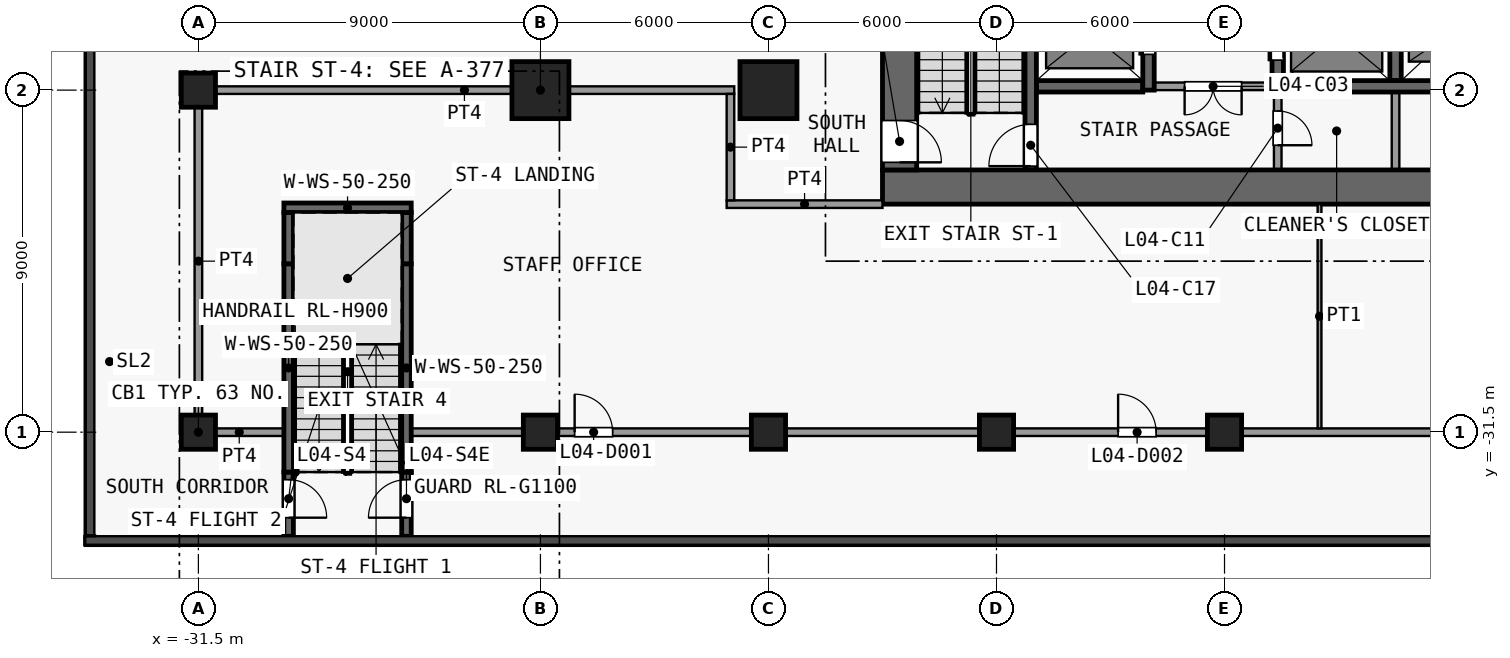
"""IFC4 building model, lengths in metres.
Left out: names, types, materials, properties, quantities, classifications, styles, units other than length and angle.
Written with IfcOpenShell. Run it as: python <this file> out.ifc"""

import sys

from ifc_helpers import new_model, si_unit, direction, frame, frame_2d, origin, origin_2d, place, context, subcontext, project, spatial, rectangle, extrude, element, fill, save


model = new_model("IFC4")
c1 = context("Model", 3, precision=1e-05, world=origin(), true_north=direction((0.0, 1.0)))
c2 = subcontext(c1, "Body", "Model", "MODEL_VIEW")
j1 = project(units=[si_unit("LENGTHUNIT", "METRE"), si_unit("PLANEANGLEUNIT", "RADIAN")], contexts=[c1])
p1 = place(None, origin())
s1 = spatial("IfcSite", under=j1, at=p1, CompositionType="ELEMENT")
p2 = place(p1, origin())
s2 = spatial("IfcBuilding", under=s1, at=p2, CompositionType="ELEMENT")
p3 = place(p2, frame((0.0, 0.0, 23.5)))
s3 = spatial("IfcBuildingStorey", under=s2, at=p3, CompositionType="ELEMENT", Elevation=23.5)
for number, where, z_axis, x_axis in (
    (1, (-31.5, -31.5, 0.0), (0.0, 0.0, 1.0), (1.0, 0.0, 0.0)),
    (2, (-31.5, -22.5, 0.0), (0.0, 0.0, 1.0), (1.0, 0.0, 0.0)),
    (3, (-22.5, -31.5, 0.0), (0.0, 0.0, 1.0), (1.0, 0.0, 0.0)),
):
    element("IfcColumn", number, at=place(p3, frame(where, z_axis=z_axis, x_axis=x_axis)), inside=s3, PredefinedType="COLUMN", context=c2, shape_type="SweptSolid", body=[
        extrude(rectangle(XDim=0.9, YDim=0.9, at=origin_2d()), origin(), (0.0, 0.0, 1.0), 4.5),
    ])
p4 = place(p3, frame((-22.5, -22.5, 0.0), z_axis=(0.0, 0.0, 1.0), x_axis=(1.0, 0.0, 0.0)))
e4 = element("IfcColumn", 4, at=p4, inside=s3, PredefinedType="COLUMN", context=c2, shape_type="SweptSolid", body=[
    extrude(rectangle(XDim=1.5, YDim=1.5, at=origin_2d()), origin(), (0.0, 0.0, 1.0), 4.5),
])
p5 = place(p3, frame((-16.5, -31.5, 0.0), z_axis=(0.0, 0.0, 1.0), x_axis=(1.0, 0.0, 0.0)))
e5 = element("IfcColumn", 5, at=p5, inside=s3, PredefinedType="COLUMN", context=c2, shape_type="SweptSolid", body=[
    extrude(rectangle(XDim=0.9, YDim=0.9, at=origin_2d()), origin(), (0.0, 0.0, 1.0), 4.5),
])
p6 = place(p3, frame((-16.5, -22.5, 0.0), z_axis=(0.0, 0.0, 1.0), x_axis=(1.0, 0.0, 0.0)))
e6 = element("IfcColumn", 6, at=p6, inside=s3, PredefinedType="COLUMN", context=c2, shape_type="SweptSolid", body=[
    extrude(rectangle(XDim=1.5, YDim=1.5, at=origin_2d()), origin(), (0.0, 0.0, 1.0), 4.5),
])
for number, where, z_axis, x_axis in (
    (7, (-10.5, -31.5, 0.0), (0.0, 0.0, 1.0), (1.0, 0.0, 0.0)),
    (8, (-4.5, -31.5, 0.0), (0.0, 0.0, 1.0), (1.0, 0.0, 0.0)),
):
    element("IfcColumn", number, at=place(p3, frame(where, z_axis=z_axis, x_axis=x_axis)), inside=s3, PredefinedType="COLUMN", context=c2, shape_type="SweptSolid", body=[
        extrude(rectangle(XDim=0.9, YDim=0.9, at=origin_2d()), origin(), (0.0, 0.0, 1.0), 4.5),
    ])
p7 = place(p3, frame((-13.5, -25.05, 0.0), z_axis=(0.0, 0.0, 1.0), x_axis=(1.0, 0.0, 0.0)))
e9 = element("IfcWall", 9, at=p7, inside=s3, PredefinedType="SHEAR", context=c2, shape_type="SweptSolid", body=[
    extrude(rectangle(XDim=27.0, YDim=0.9, at=frame_2d((13.5, 0.0))), origin(), (0.0, 0.0, 1.0), 4.15),
])
p8 = place(p3, frame((-13.05, -8.5, 0.0), z_axis=(0.0, 0.0, 1.0), x_axis=(0.0, -1.0, 0.0)))
e10 = element("IfcWall", 10, at=p8, inside=s3, PredefinedType="SHEAR", context=c2, shape_type="SweptSolid", body=[
    extrude(rectangle(XDim=16.1, YDim=0.9, at=frame_2d((8.05, 0.0))), origin(), (0.0, 0.0, 1.0), 4.15),
])
p9 = place(p8, frame((14.8, 0.0, 0.0)))
e11 = element("IfcOpeningElement", 11, at=p9, cuts=e10, PredefinedType="OPENING", context=c2, shape_type="SweptSolid", body=[
    extrude(rectangle(XDim=1.1, YDim=2.1, at=frame_2d((0.55, 1.05))), frame((0.0, 0.46, 0.0), z_axis=(0.0, -1.0, 0.0), x_axis=(1.0, 0.0, 0.0)), (0.0, 0.0, 1.0), 0.92),
])
p10 = place(p3, frame((-9.45, -22.4, 0.0), z_axis=(0.0, 0.0, 1.0), x_axis=(1.0, 0.0, 0.0)))
e12 = element("IfcWall", 12, at=p10, inside=s3, PredefinedType="SHEAR", context=c2, shape_type="SweptSolid", body=[
    extrude(rectangle(XDim=2.8, YDim=0.3, at=frame_2d((1.4, 0.0))), origin(), (0.0, 0.0, 1.0), 4.15),
])
p11 = place(p3, frame((-3.25, -22.4, 0.0), z_axis=(0.0, 0.0, 1.0), x_axis=(-1.0, 0.0, 0.0)))
e13 = element("IfcWall", 13, at=p11, inside=s3, PredefinedType="PARTITIONING", context=c2, shape_type="SweptSolid", body=[
    extrude(rectangle(XDim=3.1, YDim=0.2, at=frame_2d((1.55, 0.0))), origin(), (0.0, 0.0, 1.0), 4.15),
])
p12 = place(p11, frame((0.8, 0.0, 0.0)))
e14 = element("IfcOpeningElement", 14, at=p12, cuts=e13, PredefinedType="OPENING", context=c2, shape_type="SweptSolid", body=[
    extrude(rectangle(XDim=1.5, YDim=2.1, at=frame_2d((0.75, 1.05))), frame((0.0, 0.11, 0.0), z_axis=(0.0, -1.0, 0.0), x_axis=(1.0, 0.0, 0.0)), (0.0, 0.0, 1.0), 0.22),
])
p13 = place(p3, frame((-2.95, -22.4, 0.0), z_axis=(0.0, 0.0, 1.0), x_axis=(1.0, 0.0, 0.0)))
e15 = element("IfcWall", 15, at=p13, inside=s3, PredefinedType="SHEAR", context=c2, shape_type="SweptSolid", body=[
    extrude(rectangle(XDim=6.2, YDim=0.3, at=frame_2d((3.1, 0.0))), origin(), (0.0, 0.0, 1.0), 4.15),
])
p14 = place(p3, frame((-9.6, -24.6, 0.0), z_axis=(0.0, 0.0, 1.0), x_axis=(0.0, 1.0, 0.0)))
e16 = element("IfcWall", 16, at=p14, inside=s3, PredefinedType="SHEAR", context=c2, shape_type="SweptSolid", body=[
    extrude(rectangle(XDim=7.7, YDim=0.3, at=frame_2d((3.85, 0.0))), origin(), (0.0, 0.0, 1.0), 4.15),
])
p15 = place(p14, frame((0.1, 0.0, 0.0)))
e17 = element("IfcOpeningElement", 17, at=p15, cuts=e16, PredefinedType="OPENING", context=c2, shape_type="SweptSolid", body=[
    extrude(rectangle(XDim=1.1, YDim=2.1, at=frame_2d((0.55, 1.05))), frame((0.0, 0.16, 0.0), z_axis=(0.0, -1.0, 0.0), x_axis=(1.0, 0.0, 0.0)), (0.0, 0.0, 1.0), 0.32),
])
p16 = place(p3, frame((-6.5, -22.5, 0.0), z_axis=(0.0, 0.0, 1.0), x_axis=(0.0, 1.0, 0.0)))
e18 = element("IfcWall", 18, at=p16, inside=s3, PredefinedType="SHEAR", context=c2, shape_type="SweptSolid", body=[
    extrude(rectangle(XDim=14.0, YDim=0.3, at=frame_2d((7.0, 0.0))), origin(), (0.0, 0.0, 1.0), 4.15),
])
p17 = place(p16, frame((0.94, 0.0, 0.0)))
e19 = element("IfcOpeningElement", 19, at=p17, cuts=e18, PredefinedType="OPENING", context=c2, shape_type="SweptSolid", body=[
    extrude(rectangle(XDim=1.1, YDim=2.1, at=frame_2d((0.55, 1.05))), frame((0.0, 0.16, 0.0), z_axis=(0.0, -1.0, 0.0), x_axis=(1.0, 0.0, 0.0)), (0.0, 0.0, 1.0), 0.32),
])
p18 = place(p16, frame((3.72, 0.0, 0.0)))
e20 = element("IfcOpeningElement", 20, at=p18, cuts=e18, PredefinedType="OPENING", context=c2, shape_type="SweptSolid", body=[
    extrude(rectangle(XDim=1.1, YDim=2.1, at=frame_2d((0.55, 1.05))), frame((0.0, 0.16, 0.0), z_axis=(0.0, -1.0, 0.0), x_axis=(1.0, 0.0, 0.0)), (0.0, 0.0, 1.0), 0.32),
])
p19 = place(p16, frame((6.5, 0.0, 0.0)))
e21 = element("IfcOpeningElement", 21, at=p19, cuts=e18, PredefinedType="OPENING", context=c2, shape_type="SweptSolid", body=[
    extrude(rectangle(XDim=1.1, YDim=2.1, at=frame_2d((0.55, 1.05))), frame((0.0, 0.16, 0.0), z_axis=(0.0, -1.0, 0.0), x_axis=(1.0, 0.0, 0.0)), (0.0, 0.0, 1.0), 0.32),
])
p20 = place(p16, frame((9.28, 0.0, 0.0)))
e22 = element("IfcOpeningElement", 22, at=p20, cuts=e18, PredefinedType="OPENING", context=c2, shape_type="SweptSolid", body=[
    extrude(rectangle(XDim=1.1, YDim=2.1, at=frame_2d((0.55, 1.05))), frame((0.0, 0.16, 0.0), z_axis=(0.0, -1.0, 0.0), x_axis=(1.0, 0.0, 0.0)), (0.0, 0.0, 1.0), 0.32),
])
p21 = place(p16, frame((12.06, 0.0, 0.0)))
e23 = element("IfcOpeningElement", 23, at=p21, cuts=e18, PredefinedType="OPENING", context=c2, shape_type="SweptSolid", body=[
    extrude(rectangle(XDim=1.1, YDim=2.1, at=frame_2d((0.55, 1.05))), frame((0.0, 0.16, 0.0), z_axis=(0.0, -1.0, 0.0), x_axis=(1.0, 0.0, 0.0)), (0.0, 0.0, 1.0), 0.32),
])
p22 = place(p3, frame((-3.1, -22.55, 0.0), z_axis=(0.0, 0.0, 1.0), x_axis=(0.0, -1.0, 0.0)))
e24 = element("IfcWall", 24, at=p22, inside=s3, PredefinedType="PARTITIONING", context=c2, shape_type="SweptSolid", body=[
    extrude(rectangle(XDim=2.05, YDim=0.2, at=frame_2d((1.025, 0.0))), origin(), (0.0, 0.0, 1.0), 4.15),
])
p23 = place(p22, frame((0.5, 0.0, 0.0)))
e25 = element("IfcOpeningElement", 25, at=p23, cuts=e24, PredefinedType="OPENING", context=c2, shape_type="SweptSolid", body=[
    extrude(rectangle(XDim=0.9, YDim=2.1, at=frame_2d((0.45, 1.05))), frame((0.0, 0.11, 0.0), z_axis=(0.0, -1.0, 0.0), x_axis=(1.0, 0.0, 0.0)), (0.0, 0.0, 1.0), 0.22),
])
p24 = place(p3, frame((-3.1, -22.55, 0.0), z_axis=(0.0, 0.0, 1.0), x_axis=(0.0, 1.0, 0.0)))
e26 = element("IfcWall", 26, at=p24, inside=s3, PredefinedType="SHEAR", context=c2, shape_type="SweptSolid", body=[
    extrude(rectangle(XDim=14.05, YDim=0.3, at=frame_2d((7.025, 0.0))), origin(), (0.0, 0.0, 1.0), 4.15),
])
p25 = place(p24, frame((12.11, 0.0, 0.0)))
e27 = element("IfcOpeningElement", 27, at=p25, cuts=e26, PredefinedType="OPENING", context=c2, shape_type="SweptSolid", body=[
    extrude(rectangle(XDim=1.1, YDim=2.1, at=frame_2d((0.55, 1.05))), frame((0.0, 0.16, 0.0), z_axis=(0.0, -1.0, 0.0), x_axis=(1.0, 0.0, 0.0)), (0.0, 0.0, 1.0), 0.32),
])
p26 = place(p24, frame((0.84, 0.0, 0.0)))
e28 = element("IfcOpeningElement", 28, at=p26, cuts=e26, PredefinedType="OPENING", context=c2, shape_type="SweptSolid", body=[
    extrude(rectangle(XDim=1.4, YDim=2.1, at=frame_2d((0.7, 1.05))), frame((0.0, 0.16, 0.0), z_axis=(0.0, -1.0, 0.0), x_axis=(1.0, 0.0, 0.0)), (0.0, 0.0, 1.0), 0.32),
])
p27 = place(p3, frame((0.0, -24.6, 0.0), z_axis=(0.0, 0.0, 1.0), x_axis=(0.0, 1.0, 0.0)))
e29 = element("IfcWall", 29, at=p27, inside=s3, PredefinedType="PARTITIONING", context=c2, shape_type="SweptSolid", body=[
    extrude(rectangle(XDim=2.05, YDim=0.2, at=frame_2d((1.025, 0.0))), origin(), (0.0, 0.0, 1.0), 4.15),
])
p28 = place(p3, frame((0.0, -22.25, 0.0), z_axis=(0.0, 0.0, 1.0), x_axis=(0.0, 1.0, 0.0)))
e30 = element("IfcWall", 30, at=p28, inside=s3, PredefinedType="SHEAR", context=c2, shape_type="SweptSolid", body=[
    extrude(rectangle(XDim=13.75, YDim=0.3, at=frame_2d((6.875, 0.0))), origin(), (0.0, 0.0, 1.0), 4.15),
])
p29 = place(p3, frame((-29.125, -32.55, 0.0), z_axis=(0.0, 0.0, 1.0), x_axis=(0.0, -1.0, 0.0)))
e31 = element("IfcWall", 31, at=p29, inside=s3, PredefinedType="SHEAR", context=c2, shape_type="SweptSolid", body=[
    extrude(rectangle(XDim=1.69, YDim=0.25, at=frame_2d((0.845, 0.0))), origin(), (0.0, 0.0, 1.0), 4.15),
])
p30 = place(p29, frame((0.2, 0.0, 0.0)))
e32 = element("IfcOpeningElement", 32, at=p30, cuts=e31, PredefinedType="OPENING", context=c2, shape_type="SweptSolid", body=[
    extrude(rectangle(XDim=1.0, YDim=2.1, at=frame_2d((0.5, 1.05))), frame((0.0, 0.135, 0.0), z_axis=(0.0, -1.0, 0.0), x_axis=(1.0, 0.0, 0.0)), (0.0, 0.0, 1.0), 0.27),
])
p31 = place(p3, frame((-29.125, -32.55, 0.0), z_axis=(0.0, 0.0, 1.0), x_axis=(0.0, 1.0, 0.0)))
e33 = element("IfcWall", 33, at=p31, inside=s3, PredefinedType="SHEAR", context=c2, shape_type="SweptSolid", body=[
    extrude(rectangle(XDim=5.48, YDim=0.25, at=frame_2d((2.74, 0.0))), origin(), (0.0, 0.0, 1.0), 4.15),
])
p32 = place(p3, frame((-29.125, -27.07, 0.0), z_axis=(0.0, 0.0, 1.0), x_axis=(0.0, 1.0, 0.0)))
e34 = element("IfcWall", 34, at=p32, inside=s3, PredefinedType="SHEAR", context=c2, shape_type="SweptSolid", body=[
    extrude(rectangle(XDim=1.35, YDim=0.25, at=frame_2d((0.675, 0.0))), origin(), (0.0, 0.0, 1.0), 4.15),
])
p33 = place(p3, frame((-26.025, -34.24, 0.0), z_axis=(0.0, 0.0, 1.0), x_axis=(0.0, 1.0, 0.0)))
e35 = element("IfcWall", 35, at=p33, inside=s3, PredefinedType="SHEAR", context=c2, shape_type="SweptSolid", body=[
    extrude(rectangle(XDim=1.69, YDim=0.25, at=frame_2d((0.845, 0.0))), origin(), (0.0, 0.0, 1.0), 4.15),
])
p34 = place(p33, frame((0.49, 0.0, 0.0)))
e36 = element("IfcOpeningElement", 36, at=p34, cuts=e35, PredefinedType="OPENING", context=c2, shape_type="SweptSolid", body=[
    extrude(rectangle(XDim=1.0, YDim=2.1, at=frame_2d((0.5, 1.05))), frame((0.0, 0.135, 0.0), z_axis=(0.0, -1.0, 0.0), x_axis=(1.0, 0.0, 0.0)), (0.0, 0.0, 1.0), 0.27),
])
p35 = place(p3, frame((-26.025, -32.55, 0.0), z_axis=(0.0, 0.0, 1.0), x_axis=(0.0, 1.0, 0.0)))
e37 = element("IfcWall", 37, at=p35, inside=s3, PredefinedType="SHEAR", context=c2, shape_type="SweptSolid", body=[
    extrude(rectangle(XDim=5.48, YDim=0.25, at=frame_2d((2.74, 0.0))), origin(), (0.0, 0.0, 1.0), 4.15),
])
p36 = place(p3, frame((-26.025, -27.07, 0.0), z_axis=(0.0, 0.0, 1.0), x_axis=(0.0, 1.0, 0.0)))
e38 = element("IfcWall", 38, at=p36, inside=s3, PredefinedType="SHEAR", context=c2, shape_type="SweptSolid", body=[
    extrude(rectangle(XDim=1.35, YDim=0.25, at=frame_2d((0.675, 0.0))), origin(), (0.0, 0.0, 1.0), 4.15),
])
p37 = place(p3, frame((-29.25, -25.595, 0.0), z_axis=(0.0, 0.0, 1.0), x_axis=(1.0, 0.0, 0.0)))
e39 = element("IfcWall", 39, at=p37, inside=s3, PredefinedType="SHEAR", context=c2, shape_type="SweptSolid", body=[
    extrude(rectangle(XDim=3.35, YDim=0.25, at=frame_2d((1.675, 0.0))), origin(), (0.0, 0.0, 1.0), 4.15),
])
p38 = place(p3, frame((-31.6, -31.5, 0.0), z_axis=(0.0, 0.0, 1.0), x_axis=(1.0, 0.0, 0.0)))
e40 = element("IfcWall", 40, at=p38, inside=s3, PredefinedType="PARTITIONING", context=c2, shape_type="SweptSolid", body=[
    extrude(rectangle(XDim=2.35, YDim=0.2, at=frame_2d((1.175, 0.0))), origin(), (0.0, 0.0, 1.0), 4.15),
])
p39 = place(p3, frame((-25.9, -31.5, 0.0), z_axis=(0.0, 0.0, 1.0), x_axis=(1.0, 0.0, 0.0)))
e41 = element("IfcWall", 41, at=p39, inside=s3, PredefinedType="PARTITIONING", context=c2, shape_type="SweptSolid", body=[
    extrude(rectangle(XDim=78.15, YDim=0.2, at=frame_2d((39.075, 0.0))), origin(), (0.0, 0.0, 1.0), 4.15),
])
p40 = place(p39, frame((4.3, 0.0, 0.0)))
e42 = element("IfcOpeningElement", 42, at=p40, cuts=e41, PredefinedType="OPENING", context=c2, shape_type="SweptSolid", body=[
    extrude(rectangle(XDim=1.0, YDim=2.1, at=frame_2d((0.5, 1.05))), frame((0.0, 0.11, 0.0), z_axis=(0.0, -1.0, 0.0), x_axis=(1.0, 0.0, 0.0)), (0.0, 0.0, 1.0), 0.22),
])
p41 = place(p39, frame((18.6, 0.0, 0.0)))
e43 = element("IfcOpeningElement", 43, at=p41, cuts=e41, PredefinedType="OPENING", context=c2, shape_type="SweptSolid", body=[
    extrude(rectangle(XDim=1.0, YDim=2.1, at=frame_2d((0.5, 1.05))), frame((0.0, 0.11, 0.0), z_axis=(0.0, -1.0, 0.0), x_axis=(1.0, 0.0, 0.0)), (0.0, 0.0, 1.0), 0.22),
])
p42 = place(p39, frame((28.2, 0.0, 0.0)))
e44 = element("IfcOpeningElement", 44, at=p42, cuts=e41, PredefinedType="OPENING", context=c2, shape_type="SweptSolid", body=[
    extrude(rectangle(XDim=1.0, YDim=2.1, at=frame_2d((0.5, 1.05))), frame((0.0, 0.11, 0.0), z_axis=(0.0, -1.0, 0.0), x_axis=(1.0, 0.0, 0.0)), (0.0, 0.0, 1.0), 0.22),
])
p43 = place(p39, frame((43.0, 0.0, 0.0)))
e45 = element("IfcOpeningElement", 45, at=p43, cuts=e41, PredefinedType="OPENING", context=c2, shape_type="SweptSolid", body=[
    extrude(rectangle(XDim=1.0, YDim=2.1, at=frame_2d((0.5, 1.05))), frame((0.0, 0.11, 0.0), z_axis=(0.0, -1.0, 0.0), x_axis=(1.0, 0.0, 0.0)), (0.0, 0.0, 1.0), 0.22),
])
p44 = place(p39, frame((51.0, 0.0, 0.0)))
e46 = element("IfcOpeningElement", 46, at=p44, cuts=e41, PredefinedType="OPENING", context=c2, shape_type="SweptSolid", body=[
    extrude(rectangle(XDim=1.0, YDim=2.1, at=frame_2d((0.5, 1.05))), frame((0.0, 0.11, 0.0), z_axis=(0.0, -1.0, 0.0), x_axis=(1.0, 0.0, 0.0)), (0.0, 0.0, 1.0), 0.22),
])
p45 = place(p39, frame((61.8, 0.0, 0.0)))
e47 = element("IfcOpeningElement", 47, at=p45, cuts=e41, PredefinedType="OPENING", context=c2, shape_type="SweptSolid", body=[
    extrude(rectangle(XDim=1.0, YDim=2.1, at=frame_2d((0.5, 1.05))), frame((0.0, 0.11, 0.0), z_axis=(0.0, -1.0, 0.0), x_axis=(1.0, 0.0, 0.0)), (0.0, 0.0, 1.0), 0.22),
])
p46 = place(p39, frame((71.5, 0.0, 0.0)))
e48 = element("IfcOpeningElement", 48, at=p46, cuts=e41, PredefinedType="OPENING", context=c2, shape_type="SweptSolid", body=[
    extrude(rectangle(XDim=1.0, YDim=2.1, at=frame_2d((0.5, 1.05))), frame((0.0, 0.11, 0.0), z_axis=(0.0, -1.0, 0.0), x_axis=(1.0, 0.0, 0.0)), (0.0, 0.0, 1.0), 0.22),
])
p47 = place(p3, frame((-17.6, -25.5, 0.0), z_axis=(0.0, 0.0, 1.0), x_axis=(1.0, 0.0, 0.0)))
e49 = element("IfcWall", 49, at=p47, inside=s3, PredefinedType="PARTITIONING", context=c2, shape_type="SweptSolid", body=[
    extrude(rectangle(XDim=4.1, YDim=0.2, at=frame_2d((2.05, 0.0))), origin(), (0.0, 0.0, 1.0), 4.15),
])
p48 = place(p3, frame((-31.6, -22.5, 0.0), z_axis=(0.0, 0.0, 1.0), x_axis=(1.0, 0.0, 0.0)))
e50 = element("IfcWall", 50, at=p48, inside=s3, PredefinedType="PARTITIONING", context=c2, shape_type="SweptSolid", body=[
    extrude(rectangle(XDim=14.2, YDim=0.2, at=frame_2d((7.1, 0.0))), origin(), (0.0, 0.0, 1.0), 4.15),
])
p49 = place(p3, frame((-31.5, -31.4, 0.0), z_axis=(0.0, 0.0, 1.0), x_axis=(0.0, 1.0, 0.0)))
e51 = element("IfcWall", 51, at=p49, inside=s3, PredefinedType="PARTITIONING", context=c2, shape_type="SweptSolid", body=[
    extrude(rectangle(XDim=8.8, YDim=0.2, at=frame_2d((4.4, 0.0))), origin(), (0.0, 0.0, 1.0), 4.15),
])
p50 = place(p3, frame((-17.5, -25.4, 0.0), z_axis=(0.0, 0.0, 1.0), x_axis=(0.0, 1.0, 0.0)))
e52 = element("IfcWall", 52, at=p50, inside=s3, PredefinedType="PARTITIONING", context=c2, shape_type="SweptSolid", body=[
    extrude(rectangle(XDim=2.8, YDim=0.2, at=frame_2d((1.4, 0.0))), origin(), (0.0, 0.0, 1.0), 4.15),
])
p51 = place(p3, frame((-2.0, -31.4, 0.0), z_axis=(0.0, 0.0, 1.0), x_axis=(0.0, 1.0, 0.0)))
e53 = element("IfcWall", 53, at=p51, inside=s3, PredefinedType="PARTITIONING", context=c2, shape_type="SweptSolid", body=[
    extrude(rectangle(XDim=5.9, YDim=0.1, at=frame_2d((2.95, 0.0))), origin(), (0.0, 0.0, 1.0), 4.15),
])
p52 = place(p17, origin())
e54 = element("IfcDoor", 54, at=p52, inside=s3, OperationType="DOUBLE_DOOR_SLIDING", PredefinedType="DOOR", context=c2, shape_type="SweptSolid", body=[
    extrude(rectangle(XDim=1.1, YDim=2.1, at=frame_2d((0.55, 1.05))), frame((0.0, 0.025, 0.0), z_axis=(0.0, -1.0, 0.0), x_axis=(1.0, 0.0, 0.0)), (0.0, 0.0, 1.0), 0.05),
])
fill(e19, e54)
p53 = place(p26, origin())
e55 = element("IfcDoor", 55, at=p53, inside=s3, OperationType="DOUBLE_DOOR_SLIDING", PredefinedType="DOOR", context=c2, shape_type="SweptSolid", body=[
    extrude(rectangle(XDim=1.4, YDim=2.1, at=frame_2d((0.7, 1.05))), frame((0.0, 0.025, 0.0), z_axis=(0.0, -1.0, 0.0), x_axis=(1.0, 0.0, 0.0)), (0.0, 0.0, 1.0), 0.05),
])
fill(e28, e55)
p54 = place(p12, origin())
e56 = element("IfcDoor", 56, at=p54, inside=s3, OperationType="DOUBLE_DOOR_SINGLE_SWING", PredefinedType="DOOR", context=c2, shape_type="SweptSolid", body=[
    extrude(rectangle(XDim=1.5, YDim=2.1, at=frame_2d((0.75, 1.05))), frame((0.0, 0.025, 0.0), z_axis=(0.0, -1.0, 0.0), x_axis=(1.0, 0.0, 0.0)), (0.0, 0.0, 1.0), 0.05),
])
fill(e14, e56)
p55 = place(p23, origin())
e57 = element("IfcDoor", 57, at=p55, inside=s3, OperationType="SINGLE_SWING_RIGHT", PredefinedType="DOOR", context=c2, shape_type="SweptSolid", body=[
    extrude(rectangle(XDim=0.9, YDim=2.1, at=frame_2d((0.45, 1.05))), frame((0.0, 0.025, 0.0), z_axis=(0.0, -1.0, 0.0), x_axis=(1.0, 0.0, 0.0)), (0.0, 0.0, 1.0), 0.05),
])
fill(e25, e57)
p56 = place(p15, origin())
e58 = element("IfcDoor", 58, at=p56, inside=s3, OperationType="SINGLE_SWING_LEFT", PredefinedType="DOOR", context=c2, shape_type="SweptSolid", body=[
    extrude(rectangle(XDim=1.1, YDim=2.1, at=frame_2d((0.55, 1.05))), frame((0.0, 0.025, 0.0), z_axis=(0.0, -1.0, 0.0), x_axis=(1.0, 0.0, 0.0)), (0.0, 0.0, 1.0), 0.05),
])
fill(e17, e58)
p57 = place(p9, origin())
e59 = element("IfcDoor", 59, at=p57, inside=s3, OperationType="SINGLE_SWING_RIGHT", PredefinedType="DOOR", context=c2, shape_type="SweptSolid", body=[
    extrude(rectangle(XDim=1.1, YDim=2.1, at=frame_2d((0.55, 1.05))), frame((0.0, 0.025, 0.0), z_axis=(0.0, -1.0, 0.0), x_axis=(1.0, 0.0, 0.0)), (0.0, 0.0, 1.0), 0.05),
])
fill(e11, e59)
p58 = place(p30, origin())
e60 = element("IfcDoor", 60, at=p58, inside=s3, OperationType="SINGLE_SWING_RIGHT", PredefinedType="DOOR", context=c2, shape_type="SweptSolid", body=[
    extrude(rectangle(XDim=1.0, YDim=2.1, at=frame_2d((0.5, 1.05))), frame((0.0, 0.025, 0.0), z_axis=(0.0, -1.0, 0.0), x_axis=(1.0, 0.0, 0.0)), (0.0, 0.0, 1.0), 0.05),
])
fill(e32, e60)
p59 = place(p34, origin())
e61 = element("IfcDoor", 61, at=p59, inside=s3, OperationType="SINGLE_SWING_LEFT", PredefinedType="DOOR", context=c2, shape_type="SweptSolid", body=[
    extrude(rectangle(XDim=1.0, YDim=2.1, at=frame_2d((0.5, 1.05))), frame((0.0, 0.025, 0.0), z_axis=(0.0, -1.0, 0.0), x_axis=(1.0, 0.0, 0.0)), (0.0, 0.0, 1.0), 0.05),
])
fill(e36, e61)
p60 = place(p40, origin())
e62 = element("IfcDoor", 62, at=p60, inside=s3, OperationType="SINGLE_SWING_RIGHT", PredefinedType="DOOR", context=c2, shape_type="SweptSolid", body=[
    extrude(rectangle(XDim=1.0, YDim=2.1, at=frame_2d((0.5, 1.05))), frame((0.0, 0.025, 0.0), z_axis=(0.0, -1.0, 0.0), x_axis=(1.0, 0.0, 0.0)), (0.0, 0.0, 1.0), 0.05),
])
fill(e42, e62)
p61 = place(p41, origin())
e63 = element("IfcDoor", 63, at=p61, inside=s3, OperationType="SINGLE_SWING_RIGHT", PredefinedType="DOOR", context=c2, shape_type="SweptSolid", body=[
    extrude(rectangle(XDim=1.0, YDim=2.1, at=frame_2d((0.5, 1.05))), frame((0.0, 0.025, 0.0), z_axis=(0.0, -1.0, 0.0), x_axis=(1.0, 0.0, 0.0)), (0.0, 0.0, 1.0), 0.05),
])
fill(e43, e63)
save(model, sys.argv[1])
